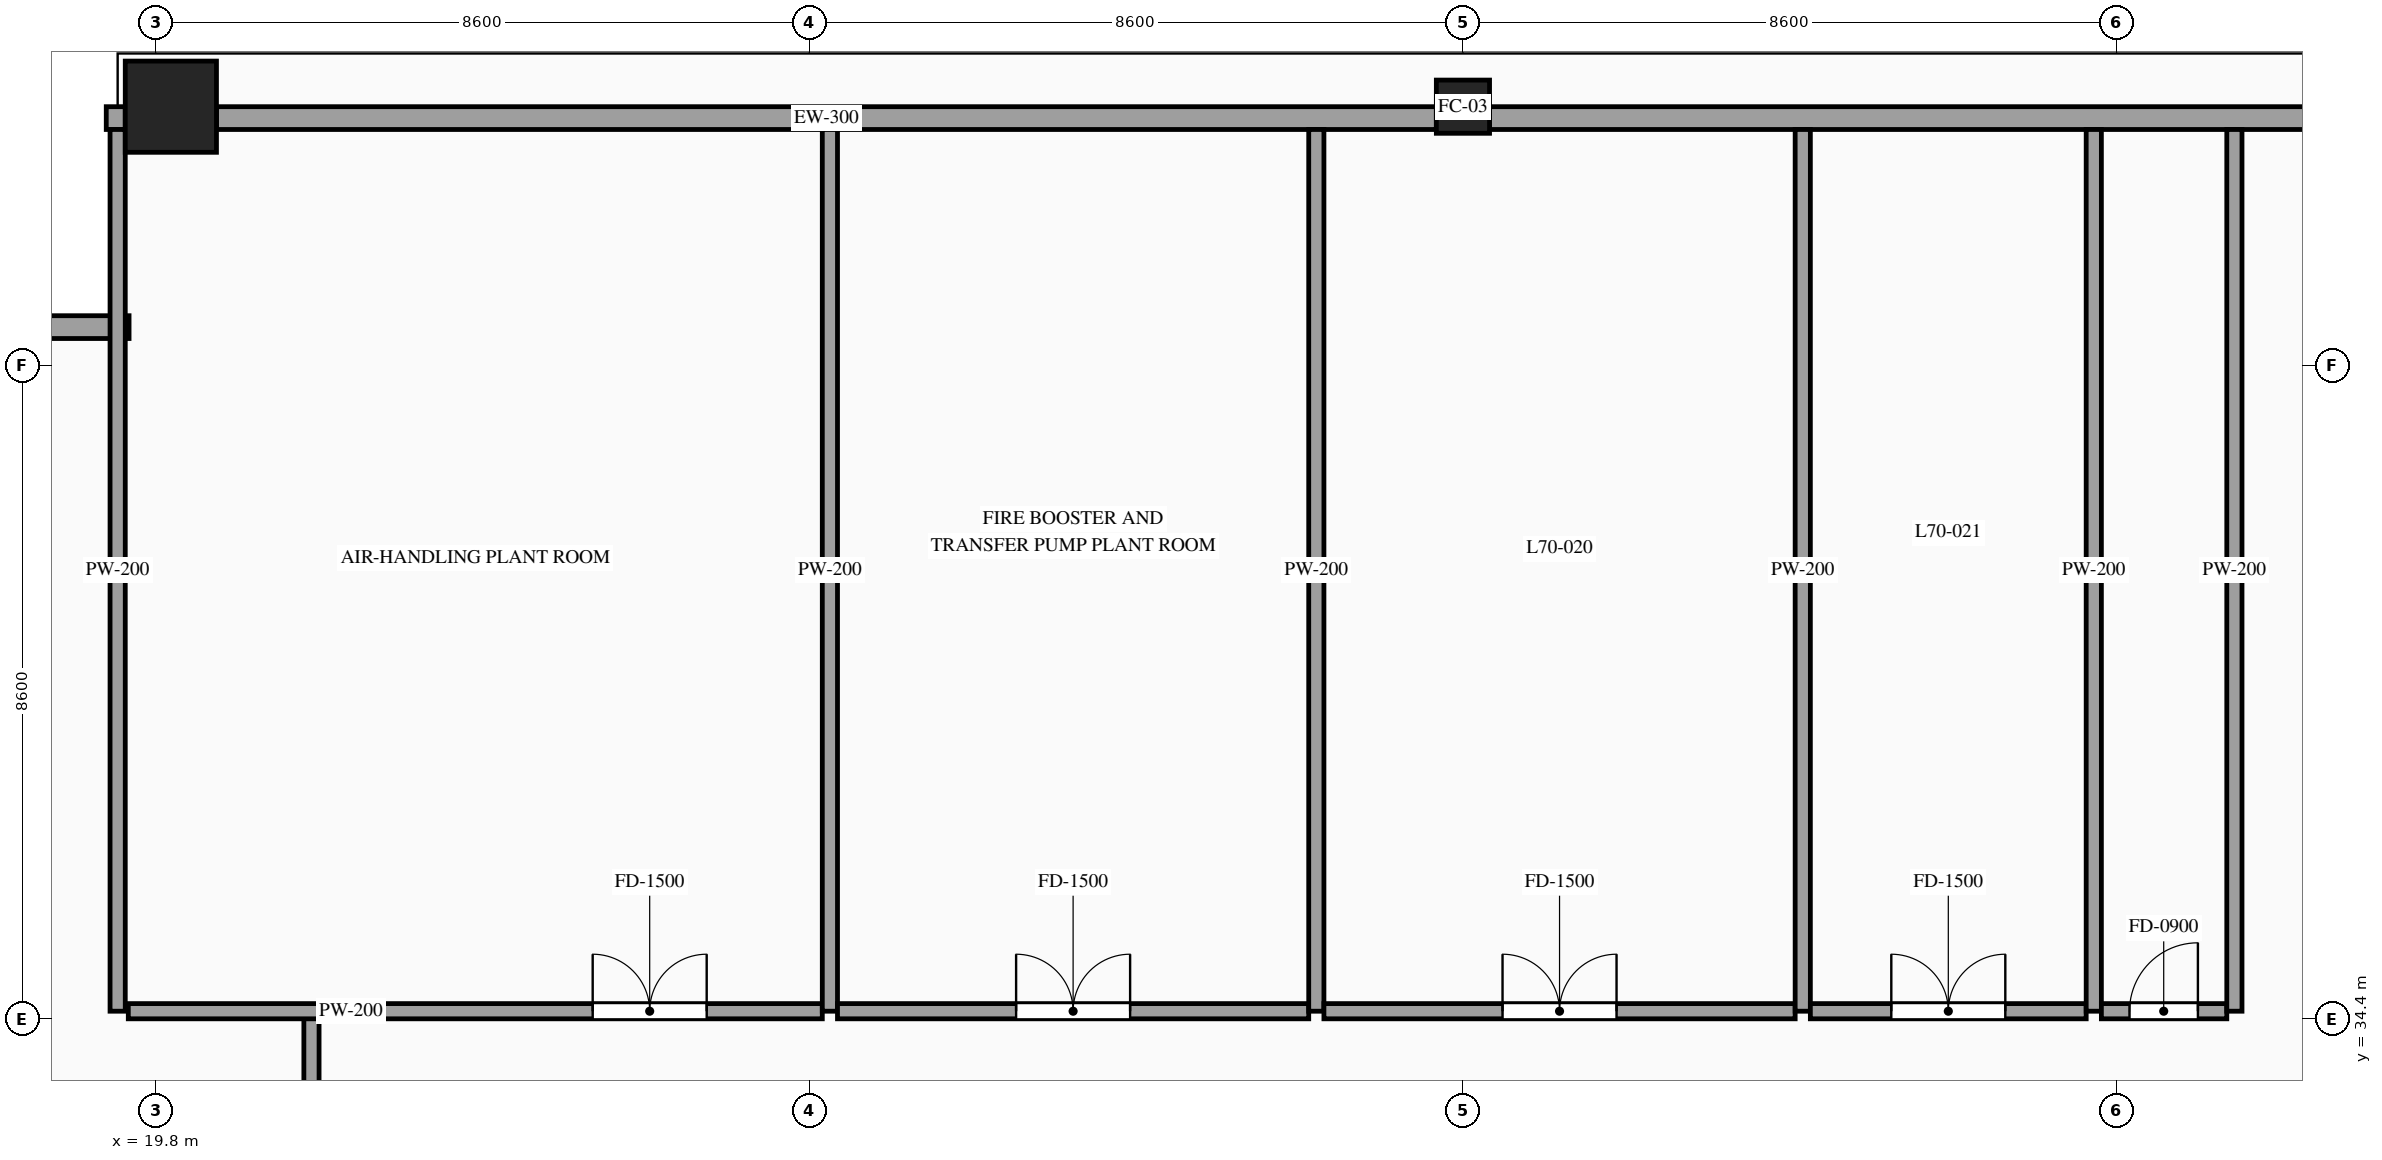
"""IFC4 building model, lengths in metres.
Left out: names, types, materials, properties, quantities, classifications, styles, units other than length and angle.
Written with IfcOpenShell. Run it as: python <this file> out.ifc"""

import sys

from ifc_helpers import new_model, si_unit, direction, frame, frame_2d, origin, origin_2d, place, context, subcontext, project, spatial, rectangle, hollow_rectangle, extrude, source, transform, mapped, element, fill, save


model = new_model("IFC4")
c1 = context("Model", 3, precision=1e-05, world=origin(), true_north=direction((0.0, 1.0)))
c2 = subcontext(c1, "Body", "Model", "MODEL_VIEW")
j1 = project(units=[si_unit("LENGTHUNIT", "METRE"), si_unit("PLANEANGLEUNIT", "RADIAN")], contexts=[c1])
p1 = place(None, origin())
s1 = spatial("IfcSite", under=j1, at=p1, CompositionType="ELEMENT")
p2 = place(p1, origin())
s2 = spatial("IfcBuilding", under=s1, at=p2, CompositionType="ELEMENT")
p3 = place(p2, frame((0.0, 0.0, 263.5)))
s3 = spatial("IfcBuildingStorey", under=s2, at=p3, CompositionType="ELEMENT", Elevation=263.5)
m1 = source(origin(), c2, "Body", "SweptSolid", [
    extrude(hollow_rectangle(XDim=1.2, YDim=1.2, WallThickness=0.055, at=origin_2d()), origin(), (0.0, 0.0, 1.0), 4.6),
])
p4 = place(p3, frame((20.0, 46.4, 0.0), z_axis=(0.0, 0.0, 1.0), x_axis=(1.0, 0.0, 0.0)))
e1 = element("IfcColumn", 1, at=p4, inside=s3, PredefinedType="COLUMN", context=c2, shape_type="MappedRepresentation", body=[
    mapped(m1, transform((0.0, 0.0, 0.0), scale=1.0)),
])
m2 = source(origin(), c2, "Body", "SweptSolid", [
    extrude(hollow_rectangle(XDim=0.7, YDim=0.7, WallThickness=0.032, at=origin_2d()), origin(), (0.0, 0.0, 1.0), 4.6),
])
p5 = place(p3, frame((37.0, 46.4, 0.0), z_axis=(0.0, 0.0, 1.0), x_axis=(1.0, 0.0, 0.0)))
e2 = element("IfcColumn", 2, at=p5, inside=s3, PredefinedType="COLUMN", context=c2, shape_type="MappedRepresentation", body=[
    mapped(m2, transform((0.0, 0.0, 0.0), scale=1.0)),
])
m3 = source(origin(), c2, "Body", "SweptSolid", [
    extrude(rectangle(XDim=2.45, YDim=0.3, at=frame_2d((1.225, 0.0))), origin(), (0.0, 0.0, 1.0), 4.38),
])
p6 = place(p3, frame((19.45, 43.5, 0.0), z_axis=(0.0, 0.0, 1.0), x_axis=(-1.0, 0.0, 0.0)))
e3 = element("IfcWall", 3, at=p6, inside=s3, PredefinedType="SOLIDWALL", context=c2, shape_type="MappedRepresentation", body=[
    mapped(m3, transform((0.0, 0.0, 0.0), scale=1.0)),
])
m4 = source(origin(), c2, "Body", "SweptSolid", [
    extrude(rectangle(XDim=0.25, YDim=0.3, at=frame_2d((0.125, 0.0))), origin(), (0.0, 0.0, 1.0), 4.38),
])
p7 = place(p3, frame((19.15, 46.25, 0.0), z_axis=(0.0, 0.0, 1.0), x_axis=(1.0, 0.0, 0.0)))
e4 = element("IfcWall", 4, at=p7, inside=s3, PredefinedType="SOLIDWALL", context=c2, shape_type="MappedRepresentation", body=[
    mapped(m4, transform((0.0, 0.0, 0.0), scale=1.0)),
])
m5 = source(origin(), c2, "Body", "SweptSolid", [
    extrude(rectangle(XDim=16.05, YDim=0.3, at=frame_2d((8.025, 0.0))), origin(), (0.0, 0.0, 1.0), 3.935),
])
for number, where, z_axis, x_axis in (
    (5, (20.6, 46.25, 0.0), (0.0, 0.0, 1.0), (1.0, 0.0, 0.0)),
    (6, (37.35, 46.25, 0.0), (0.0, 0.0, 1.0), (1.0, 0.0, 0.0)),
):
    element("IfcWall", number, at=place(p3, frame(where, z_axis=z_axis, x_axis=x_axis)), inside=s3, PredefinedType="SOLIDWALL", context=c2, shape_type="MappedRepresentation", body=[
        mapped(m5, transform((0.0, 0.0, 0.0), scale=1.0)),
    ])
m6 = source(origin(), c2, "Body", "SweptSolid", [
    extrude(rectangle(XDim=11.6, YDim=0.2, at=frame_2d((5.8, 0.0))), origin(), (0.0, 0.0, 1.0), 4.38),
])
p8 = place(p3, frame((19.3, 34.5, 0.0), z_axis=(0.0, 0.0, 1.0), x_axis=(0.0, 1.0, 0.0)))
e7 = element("IfcWall", 7, at=p8, inside=s3, PredefinedType="PARTITIONING", context=c2, shape_type="MappedRepresentation", body=[
    mapped(m6, transform((0.0, 0.0, 0.0), scale=1.0)),
])
p9 = place(p3, frame((21.85, 28.1, 0.0), z_axis=(0.0, 0.0, 1.0), x_axis=(0.0, 1.0, 0.0)))
e8 = element("IfcWall", 8, at=p9, inside=s3, PredefinedType="PARTITIONING", context=c2, shape_type="SweptSolid", body=[
    extrude(rectangle(XDim=6.4, YDim=0.2, at=frame_2d((3.2, 0.0))), origin(), (0.0, 0.0, 1.0), 4.38),
])
p10 = place(p9, frame((0.7, 0.0, 0.0)))
e9 = element("IfcOpeningElement", 9, at=p10, cuts=e8, PredefinedType="OPENING", context=c2, shape_type="SweptSolid", body=[
    extrude(rectangle(XDim=1.0, YDim=2.2, at=frame_2d((0.5, 1.1))), frame((0.0, 0.115, 0.0), z_axis=(0.0, -1.0, 0.0), x_axis=(1.0, 0.0, 0.0)), (0.0, 0.0, 1.0), 0.23),
])
p11 = place(p3, frame((19.44, 34.5, 0.0), z_axis=(0.0, 0.0, 1.0), x_axis=(1.0, 0.0, 0.0)))
e10 = element("IfcWall", 10, at=p11, inside=s3, PredefinedType="PARTITIONING", context=c2, shape_type="SweptSolid", body=[
    extrude(rectangle(XDim=9.131, YDim=0.2, at=frame_2d((4.565, 0.0))), origin(), (0.0, 0.0, 1.0), 4.38),
])
p12 = place(p11, frame((6.11, 0.0, 0.0)))
e11 = element("IfcOpeningElement", 11, at=p12, cuts=e10, PredefinedType="OPENING", context=c2, shape_type="SweptSolid", body=[
    extrude(rectangle(XDim=1.5, YDim=2.3, at=frame_2d((0.75, 1.15))), frame((0.0, 0.115, 0.0), z_axis=(0.0, -1.0, 0.0), x_axis=(1.0, 0.0, 0.0)), (0.0, 0.0, 1.0), 0.23),
])
p13 = place(p3, frame((28.671, 34.5, 0.0), z_axis=(0.0, 0.0, 1.0), x_axis=(0.0, 1.0, 0.0)))
e12 = element("IfcWall", 12, at=p13, inside=s3, PredefinedType="PARTITIONING", context=c2, shape_type="MappedRepresentation", body=[
    mapped(m6, transform((0.0, 0.0, 0.0), scale=1.0)),
])
p14 = place(p3, frame((28.771, 34.5, 0.0), z_axis=(0.0, 0.0, 1.0), x_axis=(1.0, 0.0, 0.0)))
e13 = element("IfcWall", 13, at=p14, inside=s3, PredefinedType="PARTITIONING", context=c2, shape_type="SweptSolid", body=[
    extrude(rectangle(XDim=6.2, YDim=0.2, at=frame_2d((3.1, 0.0))), origin(), (0.0, 0.0, 1.0), 4.38),
])
p15 = place(p14, frame((2.35, 0.0, 0.0)))
e14 = element("IfcOpeningElement", 14, at=p15, cuts=e13, PredefinedType="OPENING", context=c2, shape_type="SweptSolid", body=[
    extrude(rectangle(XDim=1.5, YDim=2.3, at=frame_2d((0.75, 1.15))), frame((0.0, 0.115, 0.0), z_axis=(0.0, -1.0, 0.0), x_axis=(1.0, 0.0, 0.0)), (0.0, 0.0, 1.0), 0.23),
])
p16 = place(p3, frame((35.071, 34.5, 0.0), z_axis=(0.0, 0.0, 1.0), x_axis=(0.0, 1.0, 0.0)))
e15 = element("IfcWall", 15, at=p16, inside=s3, PredefinedType="PARTITIONING", context=c2, shape_type="MappedRepresentation", body=[
    mapped(m6, transform((0.0, 0.0, 0.0), scale=1.0)),
])
p17 = place(p3, frame((35.171, 34.5, 0.0), z_axis=(0.0, 0.0, 1.0), x_axis=(1.0, 0.0, 0.0)))
e16 = element("IfcWall", 16, at=p17, inside=s3, PredefinedType="PARTITIONING", context=c2, shape_type="SweptSolid", body=[
    extrude(rectangle(XDim=6.2, YDim=0.2, at=frame_2d((3.1, 0.0))), origin(), (0.0, 0.0, 1.0), 4.38),
])
p18 = place(p17, frame((2.35, 0.0, 0.0)))
e17 = element("IfcOpeningElement", 17, at=p18, cuts=e16, PredefinedType="OPENING", context=c2, shape_type="SweptSolid", body=[
    extrude(rectangle(XDim=1.5, YDim=2.3, at=frame_2d((0.75, 1.15))), frame((0.0, 0.115, 0.0), z_axis=(0.0, -1.0, 0.0), x_axis=(1.0, 0.0, 0.0)), (0.0, 0.0, 1.0), 0.23),
])
p19 = place(p3, frame((41.471, 34.5, 0.0), z_axis=(0.0, 0.0, 1.0), x_axis=(0.0, 1.0, 0.0)))
e18 = element("IfcWall", 18, at=p19, inside=s3, PredefinedType="PARTITIONING", context=c2, shape_type="MappedRepresentation", body=[
    mapped(m6, transform((0.0, 0.0, 0.0), scale=1.0)),
])
p20 = place(p3, frame((41.571, 34.5, 0.0), z_axis=(0.0, 0.0, 1.0), x_axis=(1.0, 0.0, 0.0)))
e19 = element("IfcWall", 19, at=p20, inside=s3, PredefinedType="PARTITIONING", context=c2, shape_type="SweptSolid", body=[
    extrude(rectangle(XDim=3.629, YDim=0.2, at=frame_2d((1.814, 0.0))), origin(), (0.0, 0.0, 1.0), 4.38),
])
p21 = place(p20, frame((1.065, 0.0, 0.0)))
e20 = element("IfcOpeningElement", 20, at=p21, cuts=e19, PredefinedType="OPENING", context=c2, shape_type="SweptSolid", body=[
    extrude(rectangle(XDim=1.5, YDim=2.3, at=frame_2d((0.75, 1.15))), frame((0.0, 0.115, 0.0), z_axis=(0.0, -1.0, 0.0), x_axis=(1.0, 0.0, 0.0)), (0.0, 0.0, 1.0), 0.23),
])
p22 = place(p3, frame((45.3, 34.5, 0.0), z_axis=(0.0, 0.0, 1.0), x_axis=(0.0, 1.0, 0.0)))
e21 = element("IfcWall", 21, at=p22, inside=s3, PredefinedType="PARTITIONING", context=c2, shape_type="MappedRepresentation", body=[
    mapped(m6, transform((0.0, 0.0, 0.0), scale=1.0)),
])
p23 = place(p3, frame((45.4, 34.5, 0.0), z_axis=(0.0, 0.0, 1.0), x_axis=(1.0, 0.0, 0.0)))
e22 = element("IfcWall", 22, at=p23, inside=s3, PredefinedType="PARTITIONING", context=c2, shape_type="SweptSolid", body=[
    extrude(rectangle(XDim=1.65, YDim=0.2, at=frame_2d((0.825, 0.0))), origin(), (0.0, 0.0, 1.0), 4.38),
])
p24 = place(p23, frame((0.37, 0.0, 0.0)))
e23 = element("IfcOpeningElement", 23, at=p24, cuts=e22, PredefinedType="OPENING", context=c2, shape_type="SweptSolid", body=[
    extrude(rectangle(XDim=0.9, YDim=2.15, at=frame_2d((0.45, 1.075))), frame((0.0, 0.115, 0.0), z_axis=(0.0, -1.0, 0.0), x_axis=(1.0, 0.0, 0.0)), (0.0, 0.0, 1.0), 0.23),
])
p25 = place(p3, frame((47.15, 34.5, 0.0), z_axis=(0.0, 0.0, 1.0), x_axis=(0.0, 1.0, 0.0)))
e24 = element("IfcWall", 24, at=p25, inside=s3, PredefinedType="PARTITIONING", context=c2, shape_type="MappedRepresentation", body=[
    mapped(m6, transform((0.0, 0.0, 0.0), scale=1.0)),
])
m7 = source(origin(), c2, "Body", "SweptSolid", [
    extrude(rectangle(XDim=1.5, YDim=2.3, at=frame_2d((0.75, 1.15))), frame((0.0, 0.025, 0.0), z_axis=(0.0, -1.0, 0.0), x_axis=(1.0, 0.0, 0.0)), (0.0, 0.0, 1.0), 0.05),
])
p26 = place(p12, origin())
e25 = element("IfcDoor", 25, at=p26, inside=s3, OperationType="DOUBLE_DOOR_SINGLE_SWING", PredefinedType="DOOR", context=c2, shape_type="MappedRepresentation", body=[
    mapped(m7, transform((0.0, 0.0, 0.0), scale=1.0)),
])
fill(e11, e25)
p27 = place(p15, origin())
e26 = element("IfcDoor", 26, at=p27, inside=s3, OperationType="DOUBLE_DOOR_SINGLE_SWING", PredefinedType="DOOR", context=c2, shape_type="MappedRepresentation", body=[
    mapped(m7, transform((0.0, 0.0, 0.0), scale=1.0)),
])
fill(e14, e26)
p28 = place(p18, origin())
e27 = element("IfcDoor", 27, at=p28, inside=s3, OperationType="DOUBLE_DOOR_SINGLE_SWING", PredefinedType="DOOR", context=c2, shape_type="MappedRepresentation", body=[
    mapped(m7, transform((0.0, 0.0, 0.0), scale=1.0)),
])
fill(e17, e27)
p29 = place(p21, origin())
e28 = element("IfcDoor", 28, at=p29, inside=s3, OperationType="DOUBLE_DOOR_SINGLE_SWING", PredefinedType="DOOR", context=c2, shape_type="MappedRepresentation", body=[
    mapped(m7, transform((0.0, 0.0, 0.0), scale=1.0)),
])
fill(e20, e28)
m8 = source(origin(), c2, "Body", "SweptSolid", [
    extrude(rectangle(XDim=0.9, YDim=2.15, at=frame_2d((0.45, 1.075))), frame((0.0, 0.025, 0.0), z_axis=(0.0, -1.0, 0.0), x_axis=(1.0, 0.0, 0.0)), (0.0, 0.0, 1.0), 0.05),
])
p30 = place(p24, origin())
e29 = element("IfcDoor", 29, at=p30, inside=s3, OperationType="SINGLE_SWING_RIGHT", PredefinedType="DOOR", context=c2, shape_type="MappedRepresentation", body=[
    mapped(m8, transform((0.0, 0.0, 0.0), scale=1.0)),
])
fill(e23, e29)
save(model, sys.argv[1])
